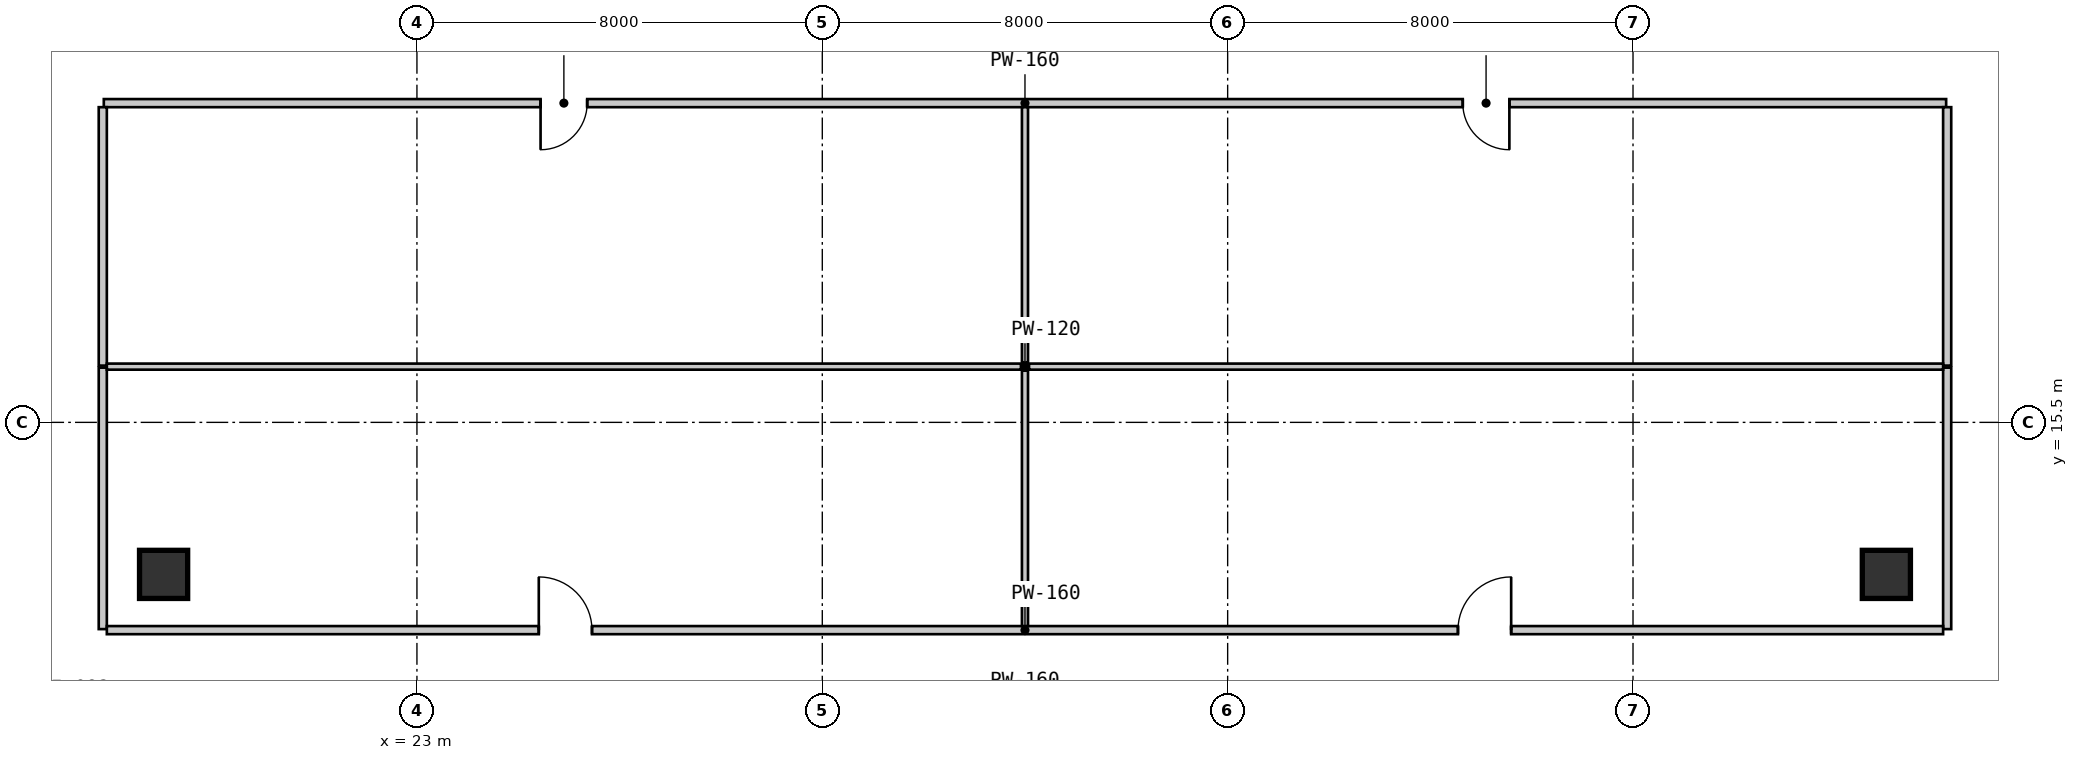
"""IFC4 building model, lengths in metres.
Left out: names, types, materials, properties, quantities, classifications, styles, units other than length and angle.
Written with IfcOpenShell. Run it as: python <this file> out.ifc"""

import sys

from ifc_helpers import new_model, si_unit, direction, frame, frame_2d, origin, origin_2d, place, context, subcontext, project, spatial, rectangle, extrude, source, transform, mapped, element, fill, save


model = new_model("IFC4")
c1 = context("Model", 3, precision=1e-05, world=origin(), true_north=direction((0.0, 1.0)))
c2 = subcontext(c1, "Body", "Model", "MODEL_VIEW")
j1 = project(units=[si_unit("LENGTHUNIT", "METRE"), si_unit("PLANEANGLEUNIT", "RADIAN")], contexts=[c1])
p1 = place(None, origin())
s1 = spatial("IfcSite", under=j1, at=p1, CompositionType="ELEMENT")
p2 = place(p1, origin())
s2 = spatial("IfcBuilding", under=s1, at=p2, CompositionType="ELEMENT")
p3 = place(p2, frame((0.0, 0.0, 19.95)))
s3 = spatial("IfcBuildingStorey", under=s2, at=p3, CompositionType="ELEMENT", Elevation=19.95)
m1 = source(origin(), c2, "Body", "SweptSolid", [
    extrude(rectangle(XDim=0.95, YDim=0.95, at=origin_2d()), origin(), (0.0, 0.0, 1.0), 3.15),
])
for number, where, z_axis, x_axis in (
    (1, (18.0, 12.5, 0.0), (0.0, 0.0, 1.0), (1.0, 0.0, 0.0)),
    (2, (52.0, 12.5, 0.0), (0.0, 0.0, 1.0), (1.0, 0.0, 0.0)),
):
    element("IfcColumn", number, at=place(p3, frame(where, z_axis=z_axis, x_axis=x_axis)), inside=s3, PredefinedType="COLUMN", context=c2, shape_type="MappedRepresentation", body=[
        mapped(m1, transform((0.0, 0.0, 0.0), scale=1.0)),
    ])
m2 = source(origin(), c2, "Body", "SweptSolid", [
    extrude(rectangle(XDim=5.16, YDim=0.16, at=frame_2d((2.58, 0.0))), origin(), (0.0, 0.0, 1.0), 2.93),
])
p4 = place(p3, frame((16.8, 16.58, 0.0), z_axis=(0.0, 0.0, 1.0), x_axis=(0.0, -1.0, 0.0)))
e3 = element("IfcWall", 3, at=p4, inside=s3, PredefinedType="PARTITIONING", context=c2, shape_type="MappedRepresentation", body=[
    mapped(m2, transform((0.0, 0.0, 0.0), scale=1.0)),
])
m3 = source(origin(), c2, "Body", "SweptSolid", [
    extrude(rectangle(XDim=18.159, YDim=0.16, at=frame_2d((9.08, 0.0))), origin(), (0.0, 0.0, 1.0), 2.93),
])
p5 = place(p3, frame((34.98, 21.8, 0.0), z_axis=(0.0, 0.0, 1.0), x_axis=(-1.0, 0.0, 0.0)))
e4 = element("IfcWall", 4, at=p5, inside=s3, PredefinedType="PARTITIONING", context=c2, shape_type="MappedRepresentation", body=[
    mapped(m3, transform((0.0, 0.0, 0.0), scale=1.0)),
])
m4 = source(origin(), c2, "Body", "SweptSolid", [
    extrude(rectangle(XDim=0.92, YDim=2.1, at=frame_2d((0.46, 1.05))), frame((0.0, 0.09, 0.0), z_axis=(0.0, -1.0, 0.0), x_axis=(1.0, 0.0, 0.0)), (0.0, 0.0, 1.0), 0.18),
])
p6 = place(p5, frame((8.62, 0.0, 0.0)))
e5 = element("IfcOpeningElement", 5, at=p6, cuts=e4, PredefinedType="OPENING", context=c2, shape_type="MappedRepresentation", body=[
    mapped(m4, transform((0.0, 0.0, 0.0), scale=1.0)),
])
m5 = source(origin(), c2, "Body", "SweptSolid", [
    extrude(rectangle(XDim=5.1, YDim=0.16, at=frame_2d((2.55, 0.0))), origin(), (0.0, 0.0, 1.0), 2.93),
])
p7 = place(p3, frame((16.8, 21.72, 0.0), z_axis=(0.0, 0.0, 1.0), x_axis=(0.0, -1.0, 0.0)))
e6 = element("IfcWall", 6, at=p7, inside=s3, PredefinedType="PARTITIONING", context=c2, shape_type="MappedRepresentation", body=[
    mapped(m5, transform((0.0, 0.0, 0.0), scale=1.0)),
])
p8 = place(p3, frame((53.2, 11.42, 0.0), z_axis=(0.0, 0.0, 1.0), x_axis=(0.0, 1.0, 0.0)))
e7 = element("IfcWall", 7, at=p8, inside=s3, PredefinedType="PARTITIONING", context=c2, shape_type="MappedRepresentation", body=[
    mapped(m2, transform((0.0, 0.0, 0.0), scale=1.0)),
])
p9 = place(p3, frame((53.18, 21.8, 0.0), z_axis=(0.0, 0.0, 1.0), x_axis=(-1.0, 0.0, 0.0)))
e8 = element("IfcWall", 8, at=p9, inside=s3, PredefinedType="PARTITIONING", context=c2, shape_type="MappedRepresentation", body=[
    mapped(m3, transform((0.0, 0.0, 0.0), scale=1.0)),
])
p10 = place(p9, frame((8.62, 0.0, 0.0)))
e9 = element("IfcOpeningElement", 9, at=p10, cuts=e8, PredefinedType="OPENING", context=c2, shape_type="MappedRepresentation", body=[
    mapped(m4, transform((0.0, 0.0, 0.0), scale=1.0)),
])
p11 = place(p3, frame((53.2, 16.62, 0.0), z_axis=(0.0, 0.0, 1.0), x_axis=(0.0, 1.0, 0.0)))
e10 = element("IfcWall", 10, at=p11, inside=s3, PredefinedType="PARTITIONING", context=c2, shape_type="MappedRepresentation", body=[
    mapped(m5, transform((0.0, 0.0, 0.0), scale=1.0)),
])
m6 = source(origin(), c2, "Body", "SweptSolid", [
    extrude(rectangle(XDim=18.1, YDim=0.16, at=frame_2d((9.05, 0.0))), origin(), (0.0, 0.0, 1.0), 2.93),
])
p12 = place(p3, frame((16.88, 11.4, 0.0), z_axis=(0.0, 0.0, 1.0), x_axis=(1.0, 0.0, 0.0)))
e11 = element("IfcWall", 11, at=p12, inside=s3, PredefinedType="PARTITIONING", context=c2, shape_type="MappedRepresentation", body=[
    mapped(m6, transform((0.0, 0.0, 0.0), scale=1.0)),
])
m7 = source(origin(), c2, "Body", "SweptSolid", [
    extrude(rectangle(XDim=1.05, YDim=2.1, at=frame_2d((0.525, 1.05))), frame((0.0, 0.09, 0.0), z_axis=(0.0, -1.0, 0.0), x_axis=(1.0, 0.0, 0.0)), (0.0, 0.0, 1.0), 0.18),
])
p13 = place(p12, frame((8.525, 0.0, 0.0)))
e12 = element("IfcOpeningElement", 12, at=p13, cuts=e11, PredefinedType="OPENING", context=c2, shape_type="MappedRepresentation", body=[
    mapped(m7, transform((0.0, 0.0, 0.0), scale=1.0)),
])
p14 = place(p3, frame((35.02, 11.4, 0.0), z_axis=(0.0, 0.0, 1.0), x_axis=(1.0, 0.0, 0.0)))
e13 = element("IfcWall", 13, at=p14, inside=s3, PredefinedType="PARTITIONING", context=c2, shape_type="MappedRepresentation", body=[
    mapped(m6, transform((0.0, 0.0, 0.0), scale=1.0)),
])
p15 = place(p14, frame((8.525, 0.0, 0.0)))
e14 = element("IfcOpeningElement", 14, at=p15, cuts=e13, PredefinedType="OPENING", context=c2, shape_type="MappedRepresentation", body=[
    mapped(m7, transform((0.0, 0.0, 0.0), scale=1.0)),
])
m8 = source(origin(), c2, "Body", "SweptSolid", [
    extrude(rectangle(XDim=18.04, YDim=0.12, at=frame_2d((9.02, 0.0))), origin(), (0.0, 0.0, 1.0), 2.93),
])
p16 = place(p3, frame((16.88, 16.6, 0.0), z_axis=(0.0, 0.0, 1.0), x_axis=(1.0, 0.0, 0.0)))
e15 = element("IfcWall", 15, at=p16, inside=s3, PredefinedType="PARTITIONING", context=c2, shape_type="MappedRepresentation", body=[
    mapped(m8, transform((0.0, 0.0, 0.0), scale=1.0)),
])
m9 = source(origin(), c2, "Body", "SweptSolid", [
    extrude(rectangle(XDim=5.04, YDim=0.12, at=frame_2d((2.52, 0.0))), origin(), (0.0, 0.0, 1.0), 2.93),
])
for number, where, z_axis, x_axis in (
    (16, (35.0, 16.52, 0.0), (0.0, 0.0, 1.0), (0.0, -1.0, 0.0)),
    (17, (35.0, 21.72, 0.0), (0.0, 0.0, 1.0), (0.0, -1.0, 0.0)),
):
    element("IfcWall", number, at=place(p3, frame(where, z_axis=z_axis, x_axis=x_axis)), inside=s3, PredefinedType="PARTITIONING", context=c2, shape_type="MappedRepresentation", body=[
        mapped(m9, transform((0.0, 0.0, 0.0), scale=1.0)),
    ])
p17 = place(p3, frame((35.08, 16.6, 0.0), z_axis=(0.0, 0.0, 1.0), x_axis=(1.0, 0.0, 0.0)))
e18 = element("IfcWall", 18, at=p17, inside=s3, PredefinedType="PARTITIONING", context=c2, shape_type="MappedRepresentation", body=[
    mapped(m8, transform((0.0, 0.0, 0.0), scale=1.0)),
])
m10 = source(origin(), c2, "Body", "SweptSolid", [
    extrude(rectangle(XDim=0.92, YDim=2.1, at=frame_2d((0.46, 1.05))), frame((0.0, 0.025, 0.0), z_axis=(0.0, -1.0, 0.0), x_axis=(1.0, 0.0, 0.0)), (0.0, 0.0, 1.0), 0.05),
])
p18 = place(p6, origin())
e19 = element("IfcDoor", 19, at=p18, inside=s3, OperationType="SINGLE_SWING_RIGHT", PredefinedType="DOOR", context=c2, shape_type="MappedRepresentation", body=[
    mapped(m10, transform((0.0, 0.0, 0.0), scale=1.0)),
])
fill(e5, e19)
p19 = place(p10, origin())
e20 = element("IfcDoor", 20, at=p19, inside=s3, OperationType="SINGLE_SWING_LEFT", PredefinedType="DOOR", context=c2, shape_type="MappedRepresentation", body=[
    mapped(m10, transform((0.0, 0.0, 0.0), scale=1.0)),
])
fill(e9, e20)
m11 = source(origin(), c2, "Body", "SweptSolid", [
    extrude(rectangle(XDim=1.05, YDim=2.1, at=frame_2d((0.525, 1.05))), frame((0.0, 0.025, 0.0), z_axis=(0.0, -1.0, 0.0), x_axis=(1.0, 0.0, 0.0)), (0.0, 0.0, 1.0), 0.05),
])
p20 = place(p13, origin())
e21 = element("IfcDoor", 21, at=p20, inside=s3, OperationType="SINGLE_SWING_LEFT", PredefinedType="DOOR", context=c2, shape_type="MappedRepresentation", body=[
    mapped(m11, transform((0.0, 0.0, 0.0), scale=1.0)),
])
fill(e12, e21)
p21 = place(p15, origin())
e22 = element("IfcDoor", 22, at=p21, inside=s3, OperationType="SINGLE_SWING_RIGHT", PredefinedType="DOOR", context=c2, shape_type="MappedRepresentation", body=[
    mapped(m11, transform((0.0, 0.0, 0.0), scale=1.0)),
])
fill(e14, e22)
save(model, sys.argv[1])
